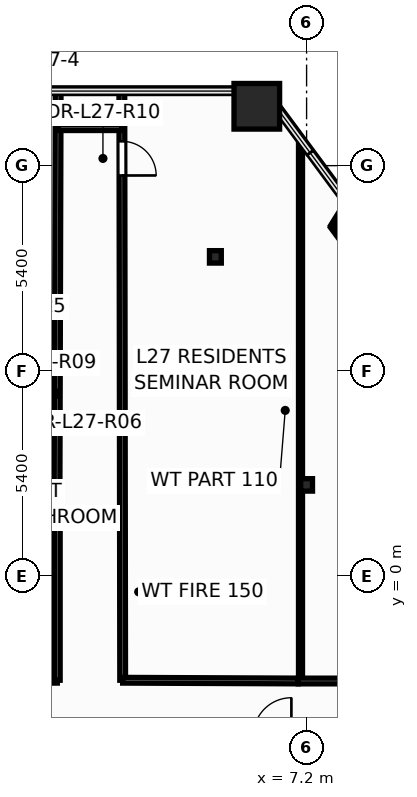
"""IFC4 building model, lengths in metres.
Left out: names, types, materials, properties, quantities, classifications, styles, units other than length and angle.
Written with IfcOpenShell. Run it as: python <this file> out.ifc"""

import sys

from ifc_helpers import new_model, si_unit, direction, frame, frame_2d, origin, origin_2d, place, context, subcontext, project, spatial, rectangle, hollow_rectangle, i_section, extrude, element, fill, save


model = new_model("IFC4")
c1 = context("Model", 3, precision=1e-05, world=origin(), true_north=direction((0.0, 1.0)))
c2 = subcontext(c1, "Body", "Model", "MODEL_VIEW")
j1 = project(units=[si_unit("LENGTHUNIT", "METRE"), si_unit("PLANEANGLEUNIT", "RADIAN")], contexts=[c1])
p1 = place(None, origin())
s1 = spatial("IfcSite", under=j1, at=p1, CompositionType="ELEMENT")
p2 = place(p1, origin())
s2 = spatial("IfcBuilding", under=s1, at=p2, CompositionType="ELEMENT")
p3 = place(p2, frame((0.0, 0.0, 106.8)))
s3 = spatial("IfcBuildingStorey", under=s2, at=p3, CompositionType="ELEMENT", Elevation=106.8)
p4 = place(p3, frame((5.89, 12.362, 0.0), z_axis=(0.0, 0.0, 1.0), x_axis=(1.0, 0.0, 0.0)))
e1 = element("IfcColumn", 1, at=p4, inside=s3, PredefinedType="COLUMN", context=c2, shape_type="SweptSolid", body=[
    extrude(hollow_rectangle(XDim=1.2, YDim=1.2, WallThickness=0.055, at=origin_2d()), origin(), (0.0, 0.0, 1.0), 3.6),
])
for number, where, z_axis, x_axis in (
    (2, (7.2, 2.4, 0.0), (0.0, 0.0, 1.0), (1.0, 0.0, 0.0)),
    (3, (4.8, 8.4, 0.0), (0.0, 0.0, 1.0), (1.0, 0.0, 0.0)),
):
    element("IfcColumn", number, at=place(p3, frame(where, z_axis=z_axis, x_axis=x_axis)), inside=s3, PredefinedType="COLUMN", context=c2, shape_type="SweptSolid", body=[
        extrude(i_section(OverallWidth=0.311, OverallDepth=0.327, WebThickness=0.016, FlangeThickness=0.025, at=origin_2d()), origin(), (0.0, 0.0, 1.0), 3.6),
    ])
p5 = place(p3, frame((2.339, 12.762, 0.0), z_axis=(0.0, 0.0, 1.0), x_axis=(0.001385890916, -0.999999039653, 0.0)))
e4 = element("IfcWall", 4, at=p5, inside=s3, PredefinedType="PARTITIONING", context=c2, shape_type="SweptSolid", body=[
    extrude(rectangle(XDim=15.502, YDim=0.15, at=frame_2d((7.751, 0.0))), origin(), (0.0, 0.0, 1.0), 2.325),
])
p6 = place(p5, frame((1.322, 0.0, 0.0)))
e5 = element("IfcOpeningElement", 5, at=p6, cuts=e4, PredefinedType="OPENING", context=c2, shape_type="SweptSolid", body=[
    extrude(rectangle(XDim=0.906, YDim=2.104, at=frame_2d((0.45, 1.052))), frame((0.0, 0.085, 0.0), z_axis=(0.0, -1.0, 0.0), x_axis=(1.0, 0.0, 0.0)), (0.0, 0.0, 1.0), 0.17),
])
p7 = place(p3, frame((7.04, -2.76, 0.0), z_axis=(0.0, 0.0, 1.0), x_axis=(0.0, 1.0, 0.0)))
e6 = element("IfcWall", 6, at=p7, inside=s3, PredefinedType="PARTITIONING", context=c2, shape_type="SweptSolid", body=[
    extrude(rectangle(XDim=14.241, YDim=0.105, at=frame_2d((7.12, 0.0))), origin(), (0.0, 0.0, 1.0), 2.325),
])
p8 = place(p3, frame((0.632, 1.98, 0.0), z_axis=(0.0, 0.0, 1.0), x_axis=(0.002830348232, 0.999995994556, 0.0)))
e7 = element("IfcWall", 7, at=p8, inside=s3, PredefinedType="PARTITIONING", context=c2, shape_type="SweptSolid", body=[
    extrude(rectangle(XDim=10.782, YDim=0.15, at=frame_2d((5.391, 0.0))), origin(), (0.0, 0.0, 1.0), 2.325),
])
p9 = place(p3, frame((-5.6, -2.76, 0.0), z_axis=(0.0, 0.0, 1.0), x_axis=(0.999994853563, 0.003208246723, 0.0)))
e8 = element("IfcWall", 8, at=p9, inside=s3, PredefinedType="PARTITIONING", context=c2, shape_type="SweptSolid", body=[
    extrude(rectangle(XDim=6.24, YDim=0.15, at=frame_2d((3.12, 0.0))), origin(), (0.0, 0.0, 1.0), 2.325),
])
p10 = place(p9, frame((0.439, 0.0, 0.0)))
e9 = element("IfcOpeningElement", 9, at=p10, cuts=e8, PredefinedType="OPENING", context=c2, shape_type="SweptSolid", body=[
    extrude(rectangle(XDim=0.906, YDim=2.104, at=frame_2d((0.45, 1.052))), frame((0.0, 0.085, 0.0), z_axis=(0.0, -1.0, 0.0), x_axis=(1.0, 0.0, 0.0)), (0.0, 0.0, 1.0), 0.17),
])
p11 = place(p3, frame((6.98, -2.76, 0.0), z_axis=(0.0, 0.0, 1.0), x_axis=(1.0, 0.0, 0.0)))
e10 = element("IfcWall", 10, at=p11, inside=s3, PredefinedType="PARTITIONING", context=c2, shape_type="SweptSolid", body=[
    extrude(rectangle(XDim=5.52, YDim=0.15, at=frame_2d((2.76, 0.0))), origin(), (0.0, 0.0, 1.0), 2.325),
])
p12 = place(p11, frame((1.792, 0.0, 0.0)))
e11 = element("IfcOpeningElement", 11, at=p12, cuts=e10, PredefinedType="OPENING", context=c2, shape_type="SweptSolid", body=[
    extrude(rectangle(XDim=0.906, YDim=2.104, at=frame_2d((0.45, 1.052))), frame((0.0, 0.085, 0.0), z_axis=(0.0, -1.0, 0.0), x_axis=(1.0, 0.0, 0.0)), (0.0, 0.0, 1.0), 0.17),
])
p13 = place(p3, frame((0.64, -2.74, 0.0), z_axis=(0.0, 0.0, 1.0), x_axis=(0.0, 1.0, 0.0)))
e12 = element("IfcWall", 12, at=p13, inside=s3, PredefinedType="PARTITIONING", context=c2, shape_type="SweptSolid", body=[
    extrude(rectangle(XDim=4.718, YDim=0.15, at=frame_2d((2.359, 0.0))), origin(), (0.0, 0.0, 1.0), 3.35),
])
p14 = place(p3, frame((2.36, -2.74, 0.0), z_axis=(0.0, 0.0, 1.0), x_axis=(0.999991056007, -0.0042294097, 0.0)))
e13 = element("IfcWall", 13, at=p14, inside=s3, PredefinedType="PARTITIONING", context=c2, shape_type="SweptSolid", body=[
    extrude(rectangle(XDim=4.618, YDim=0.15, at=frame_2d((2.309, 0.0))), origin(), (0.0, 0.0, 1.0), 2.918),
])
p15 = place(p3, frame((9.249, 7.353, 0.0), z_axis=(0.0, 0.0, 1.0), x_axis=(-0.594914508596, 0.803788981924, 0.0)))
e14 = element("IfcWall", 14, at=p15, inside=s3, PredefinedType="PARTITIONING", context=c2, shape_type="SweptSolid", body=[
    extrude(rectangle(XDim=2.294, YDim=0.12, at=frame_2d((1.147, 0.0))), origin(), (0.0, 0.0, 1.0), 3.35),
])
p16 = place(p3, frame((-0.758, 2.04, 0.0), z_axis=(0.0, 0.0, 1.0), x_axis=(1.0, 0.0, 0.0)))
e15 = element("IfcWall", 15, at=p16, inside=s3, PredefinedType="PARTITIONING", context=c2, shape_type="SweptSolid", body=[
    extrude(rectangle(XDim=1.398, YDim=0.135, at=frame_2d((0.699, 0.0))), origin(), (0.0, 0.0, 1.0), 2.325),
])
p17 = place(p3, frame((-0.82, 4.8, 0.0), z_axis=(0.0, 0.0, 1.0), x_axis=(1.0, 0.0, 0.0)))
e16 = element("IfcWall", 16, at=p17, inside=s3, PredefinedType="PARTITIONING", context=c2, shape_type="SweptSolid", body=[
    extrude(rectangle(XDim=1.46, YDim=0.135, at=frame_2d((0.73, 0.0))), origin(), (0.0, 0.0, 1.0), 2.325),
])
p18 = place(p3, frame((0.66, 11.8, 0.0), z_axis=(0.0, 0.0, 1.0), x_axis=(1.0, 0.0, 0.0)))
e17 = element("IfcWall", 17, at=p18, inside=s3, PredefinedType="PARTITIONING", context=c2, shape_type="SweptSolid", body=[
    extrude(rectangle(XDim=1.68, YDim=0.15, at=frame_2d((0.84, 0.0))), origin(), (0.0, 0.0, 1.0), 3.35),
])
p19 = place(p3, frame((7.884, 9.198, 0.0), z_axis=(0.0, 0.0, 1.0), x_axis=(0.528079385195, 0.849195008777, 0.0)))
e18 = element("IfcWall", 18, at=p19, inside=s3, PredefinedType="PARTITIONING", context=c2, shape_type="SweptSolid", body=[
    extrude(rectangle(XDim=0.721, YDim=0.12, at=frame_2d((0.36, 0.0))), origin(), (0.0, 0.0, 1.0), 2.713),
])
p20 = place(p6, origin())
e19 = element("IfcDoor", 19, at=p20, inside=s3, OperationType="SINGLE_SWING_RIGHT", PredefinedType="DOOR", context=c2, shape_type="SweptSolid", body=[
    extrude(rectangle(XDim=0.9, YDim=2.1, at=frame_2d((0.45, 1.05))), frame((0.0, 0.025, 0.0), z_axis=(0.0, -1.0, 0.0), x_axis=(1.0, 0.0, 0.0)), (0.0, 0.0, 1.0), 0.05),
])
fill(e5, e19)
save(model, sys.argv[1])
